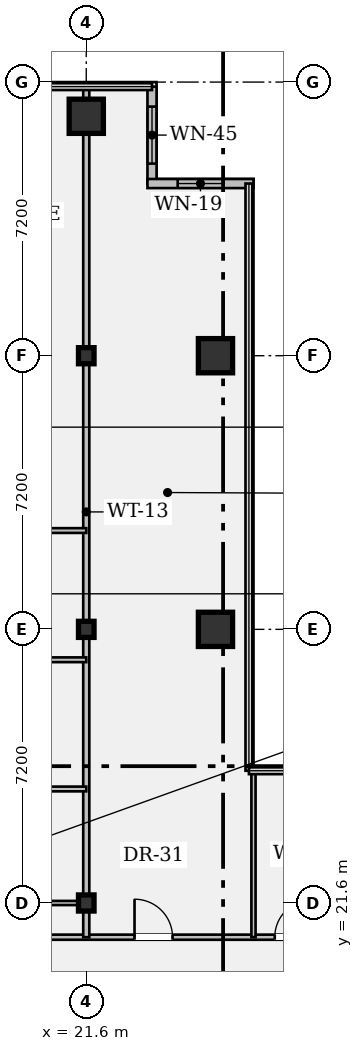
"""IFC4 building model, lengths in metres.
Left out: names, types, materials, properties, quantities, classifications, styles, units other than length and angle.
Written with IfcOpenShell. Run it as: python <this file> out.ifc"""

import sys

from ifc_helpers import new_model, si_unit, direction, frame, frame_2d, origin, origin_2d, place, context, subcontext, project, spatial, rectangle, hollow_rectangle, i_section, extrude, element, fill, save


model = new_model("IFC4")
c1 = context("Model", 3, precision=1e-05, world=origin(), true_north=direction((0.0, 1.0)))
c2 = subcontext(c1, "Body", "Model", "MODEL_VIEW")
j1 = project(units=[si_unit("LENGTHUNIT", "METRE"), si_unit("PLANEANGLEUNIT", "RADIAN")], contexts=[c1])
p1 = place(None, origin())
s1 = spatial("IfcSite", under=j1, at=p1, CompositionType="ELEMENT")
p2 = place(p1, origin())
s2 = spatial("IfcBuilding", under=s1, at=p2, CompositionType="ELEMENT")
p3 = place(p2, frame((0.0, 0.0, 129.15)))
s3 = spatial("IfcBuildingStorey", under=s2, at=p3, CompositionType="ELEMENT", Elevation=129.15)
for number, where, z_axis, x_axis in (
    (1, (21.6, 21.6, 0.0), (0.0, 0.0, 1.0), (1.0, 0.0, 0.0)),
    (2, (21.6, 28.8, 0.0), (0.0, 0.0, 1.0), (1.0, 0.0, 0.0)),
    (3, (21.6, 36.0, 0.0), (0.0, 0.0, 1.0), (1.0, 0.0, 0.0)),
):
    element("IfcColumn", number, at=place(p3, frame(where, z_axis=z_axis, x_axis=x_axis)), inside=s3, PredefinedType="COLUMN", context=c2, shape_type="SweptSolid", body=[
        extrude(i_section(OverallWidth=0.409, OverallDepth=0.424, WebThickness=0.033, FlangeThickness=0.052, FilletRadius=0.018, at=origin_2d()), origin(), (0.0, 0.0, 1.0), 3.58),
    ])
for number, where, z_axis, x_axis in (
    (4, (21.6, 42.3, 0.0), (0.0, 0.0, 1.0), (1.0, 0.0, 0.0)),
    (5, (25.0, 28.8, 0.0), (0.0, 0.0, 1.0), (1.0, 0.0, 0.0)),
    (6, (25.0, 36.0, 0.0), (0.0, 0.0, 1.0), (1.0, 0.0, 0.0)),
):
    element("IfcColumn", number, at=place(p3, frame(where, z_axis=z_axis, x_axis=x_axis)), inside=s3, PredefinedType="COLUMN", context=c2, shape_type="SweptSolid", body=[
        extrude(hollow_rectangle(XDim=0.9, YDim=0.9, WallThickness=0.055, at=origin_2d()), origin(), (0.0, 0.0, 1.0), 3.58),
    ])
p4 = place(p3, frame((23.33, 43.08, 0.0), z_axis=(0.0, 0.0, 1.0), x_axis=(0.0, -1.0, 0.0)))
e7 = element("IfcWall", 7, at=p4, inside=s3, PredefinedType="STANDARD", context=c2, shape_type="SweptSolid", body=[
    extrude(rectangle(XDim=2.55, YDim=0.24, at=frame_2d((1.275, 0.0))), origin(), (0.0, 0.0, 1.0), 3.58),
])
p5 = place(p4, frame((0.525, 0.0, 0.95)))
e8 = element("IfcOpeningElement", 8, at=p5, cuts=e7, PredefinedType="OPENING", context=c2, shape_type="SweptSolid", body=[
    extrude(rectangle(XDim=1.5, YDim=1.8, at=frame_2d((0.75, 0.9))), frame((0.0, 0.132, 0.0), z_axis=(0.0, -1.0, 0.0), x_axis=(1.0, 0.0, 0.0)), (0.0, 0.0, 1.0), 0.264),
])
p6 = place(p3, frame((23.21, 40.53, 0.0), z_axis=(0.0, 0.0, 1.0), x_axis=(1.0, 0.0, 0.0)))
e9 = element("IfcWall", 9, at=p6, inside=s3, PredefinedType="STANDARD", context=c2, shape_type="SweptSolid", body=[
    extrude(rectangle(XDim=2.79, YDim=0.24, at=frame_2d((1.395, 0.0))), origin(), (0.0, 0.0, 1.0), 3.58),
])
p7 = place(p6, frame((0.795, 0.0, 0.95)))
e10 = element("IfcOpeningElement", 10, at=p7, cuts=e9, PredefinedType="OPENING", context=c2, shape_type="SweptSolid", body=[
    extrude(rectangle(XDim=1.2, YDim=1.8, at=frame_2d((0.6, 0.9))), frame((0.0, 0.132, 0.0), z_axis=(0.0, -1.0, 0.0), x_axis=(1.0, 0.0, 0.0)), (0.0, 0.0, 1.0), 0.264),
])
p8 = place(p3, frame((17.35, 20.7, 0.0), z_axis=(0.0, 0.0, 1.0), x_axis=(1.0, 0.0, 0.0)))
e11 = element("IfcWall", 11, at=p8, inside=s3, PredefinedType="PARTITIONING", context=c2, shape_type="SweptSolid", body=[
    extrude(rectangle(XDim=19.95, YDim=0.135, at=frame_2d((9.975, 0.0))), origin(), (0.0, 0.0, 1.0), 2.869),
])
p9 = place(p8, frame((5.52, 0.0, 0.0)))
e12 = element("IfcOpeningElement", 12, at=p9, cuts=e11, PredefinedType="OPENING", context=c2, shape_type="SweptSolid", body=[
    extrude(rectangle(XDim=1.0, YDim=2.15, at=frame_2d((0.5, 1.075))), frame((0.0, 0.08, 0.0), z_axis=(0.0, -1.0, 0.0), x_axis=(1.0, 0.0, 0.0)), (0.0, 0.0, 1.0), 0.159),
])
p10 = place(p8, frame((9.21, 0.0, 0.0)))
e13 = element("IfcOpeningElement", 13, at=p10, cuts=e11, PredefinedType="OPENING", context=c2, shape_type="SweptSolid", body=[
    extrude(rectangle(XDim=0.98, YDim=2.15, at=frame_2d((0.49, 1.075))), frame((0.0, 0.08, 0.0), z_axis=(0.0, -1.0, 0.0), x_axis=(1.0, 0.0, 0.0)), (0.0, 0.0, 1.0), 0.159),
])
p11 = place(p3, frame((17.35, 21.6, 0.0), z_axis=(0.0, 0.0, 1.0), x_axis=(1.0, 0.0, 0.0)))
e14 = element("IfcWall", 14, at=p11, inside=s3, PredefinedType="PARTITIONING", context=c2, shape_type="SweptSolid", body=[
    extrude(rectangle(XDim=4.25, YDim=0.11, at=frame_2d((2.125, 0.0))), origin(), (0.0, 0.0, 1.0), 2.869),
])
p12 = place(p3, frame((21.6, 20.7, 0.0), z_axis=(0.0, 0.0, 1.0), x_axis=(0.0, 1.0, 0.0)))
e15 = element("IfcWall", 15, at=p12, inside=s3, PredefinedType="PARTITIONING", context=c2, shape_type="SweptSolid", body=[
    extrude(rectangle(XDim=22.38, YDim=0.16, at=frame_2d((11.19, 0.0))), origin(), (0.0, 0.0, 1.0), 2.869),
])
for number, where, z_axis, x_axis in (
    (16, (17.35, 24.6, 0.0), (0.0, 0.0, 1.0), (1.0, 0.0, 0.0)),
    (17, (17.35, 28.0, 0.0), (0.0, 0.0, 1.0), (1.0, 0.0, 0.0)),
    (18, (17.35, 31.4, 0.0), (0.0, 0.0, 1.0), (1.0, 0.0, 0.0)),
):
    element("IfcWall", number, at=place(p3, frame(where, z_axis=z_axis, x_axis=x_axis)), inside=s3, PredefinedType="PARTITIONING", context=c2, shape_type="SweptSolid", body=[
        extrude(rectangle(XDim=4.25, YDim=0.125, at=frame_2d((2.125, 0.0))), origin(), (0.0, 0.0, 1.0), 2.869),
    ])
p13 = place(p3, frame((26.0, 20.7, 0.0), z_axis=(0.0, 0.0, 1.0), x_axis=(0.0, 1.0, 0.0)))
e19 = element("IfcWall", 19, at=p13, inside=s3, PredefinedType="PARTITIONING", context=c2, shape_type="SweptSolid", body=[
    extrude(rectangle(XDim=4.38, YDim=0.11, at=frame_2d((2.19, 0.0))), origin(), (0.0, 0.0, 1.0), 2.869),
])
p14 = place(p5, origin())
e20 = element("IfcWindow", 20, at=p14, inside=s3, PartitioningType="SINGLE_PANEL", PredefinedType="WINDOW", context=c2, shape_type="SweptSolid", body=[
    extrude(rectangle(XDim=1.5, YDim=1.8, at=frame_2d((0.75, 0.9))), frame((0.0, 0.03, 0.0), z_axis=(0.0, -1.0, 0.0), x_axis=(1.0, 0.0, 0.0)), (0.0, 0.0, 1.0), 0.06),
])
fill(e8, e20)
p15 = place(p7, origin())
e21 = element("IfcWindow", 21, at=p15, inside=s3, PartitioningType="SINGLE_PANEL", PredefinedType="WINDOW", context=c2, shape_type="SweptSolid", body=[
    extrude(rectangle(XDim=1.2, YDim=1.8, at=frame_2d((0.6, 0.9))), frame((0.0, 0.03, 0.0), z_axis=(0.0, -1.0, 0.0), x_axis=(1.0, 0.0, 0.0)), (0.0, 0.0, 1.0), 0.06),
])
fill(e10, e21)
p16 = place(p9, origin())
e22 = element("IfcDoor", 22, at=p16, inside=s3, OperationType="SINGLE_SWING_LEFT", PredefinedType="DOOR", context=c2, shape_type="SweptSolid", body=[
    extrude(rectangle(XDim=1.0, YDim=2.15, at=frame_2d((0.5, 1.075))), frame((0.0, 0.025, 0.0), z_axis=(0.0, -1.0, 0.0), x_axis=(1.0, 0.0, 0.0)), (0.0, 0.0, 1.0), 0.05),
])
fill(e12, e22)
p17 = place(p10, origin())
e23 = element("IfcDoor", 23, at=p17, inside=s3, OperationType="SINGLE_SWING_RIGHT", PredefinedType="DOOR", context=c2, shape_type="SweptSolid", body=[
    extrude(rectangle(XDim=0.98, YDim=2.15, at=frame_2d((0.49, 1.075))), frame((0.0, 0.025, 0.0), z_axis=(0.0, -1.0, 0.0), x_axis=(1.0, 0.0, 0.0)), (0.0, 0.0, 1.0), 0.05),
])
fill(e13, e23)
save(model, sys.argv[1])
